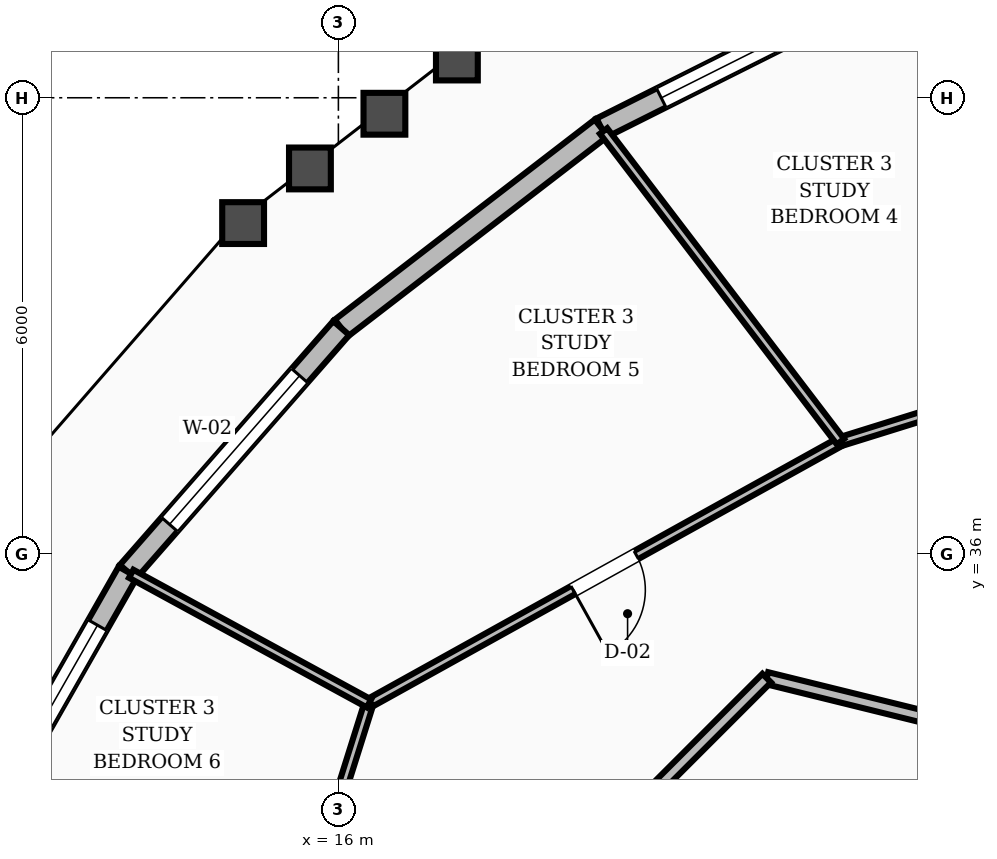
"""IFC4 building model, lengths in metres.
Left out: names, types, materials, properties, quantities, classifications, styles, units other than length and angle.
Written with IfcOpenShell. Run it as: python <this file> out.ifc"""

import sys

from ifc_helpers import new_model, si_unit, direction, frame, frame_2d, origin, place, context, subcontext, project, spatial, rectangle, extrude, element, fill, save


model = new_model("IFC4")
c1 = context("Model", 3, precision=1e-05, world=origin(), true_north=direction((0.0, 1.0)))
c2 = subcontext(c1, "Body", "Model", "MODEL_VIEW")
j1 = project(units=[si_unit("LENGTHUNIT", "METRE"), si_unit("PLANEANGLEUNIT", "RADIAN")], contexts=[c1])
p1 = place(None, origin())
s1 = spatial("IfcSite", under=j1, at=p1, CompositionType="ELEMENT")
p2 = place(p1, origin())
s2 = spatial("IfcBuilding", under=s1, at=p2, CompositionType="ELEMENT")
p3 = place(p2, frame((0.0, 0.0, 229.2)))
s3 = spatial("IfcBuildingStorey", under=s2, at=p3, CompositionType="ELEMENT", Elevation=229.2)
p4 = place(p3, frame((23.361, 43.559, 0.0), z_axis=(0.0, 0.0, 1.0), x_axis=(-0.893979362311, -0.448108134005, 0.0)))
e1 = element("IfcWall", 1, at=p4, inside=s3, PredefinedType="STANDARD", context=c2, shape_type="SweptSolid", body=[
    extrude(rectangle(XDim=4.366, YDim=0.28, at=frame_2d((2.183, 0.0))), origin(), (0.0, 0.0, 1.0), 2.88),
])
p5 = place(p4, frame((0.883, 0.0, 0.8)))
e2 = element("IfcOpeningElement", 2, at=p5, cuts=e1, PredefinedType="OPENING", context=c2, shape_type="SweptSolid", body=[
    extrude(rectangle(XDim=2.6, YDim=1.65, at=frame_2d((1.3, 0.825))), frame((0.0, 0.15, 0.0), z_axis=(0.0, -1.0, 0.0), x_axis=(1.0, 0.0, 0.0)), (0.0, 0.0, 1.0), 0.3),
])
p6 = place(p3, frame((19.458, 41.603, 0.0), z_axis=(0.0, 0.0, 1.0), x_axis=(-0.792451546341, -0.609934870869, 0.0)))
e3 = element("IfcWall", 3, at=p6, inside=s3, PredefinedType="STANDARD", context=c2, shape_type="SweptSolid", body=[
    extrude(rectangle(XDim=4.317, YDim=0.28, at=frame_2d((2.158, 0.0))), origin(), (0.0, 0.0, 1.0), 2.88),
])
p7 = place(p3, frame((16.038, 38.97, 0.0), z_axis=(0.0, 0.0, 1.0), x_axis=(-0.65855326106, -0.752534120387, 0.0)))
e4 = element("IfcWall", 4, at=p7, inside=s3, PredefinedType="STANDARD", context=c2, shape_type="SweptSolid", body=[
    extrude(rectangle(XDim=4.263, YDim=0.28, at=frame_2d((2.131, 0.0))), origin(), (0.0, 0.0, 1.0), 2.88),
])
p8 = place(p7, frame((0.832, 0.0, 0.8)))
e5 = element("IfcOpeningElement", 5, at=p8, cuts=e4, PredefinedType="OPENING", context=c2, shape_type="SweptSolid", body=[
    extrude(rectangle(XDim=2.6, YDim=1.65, at=frame_2d((1.3, 0.825))), frame((0.0, 0.15, 0.0), z_axis=(0.0, -1.0, 0.0), x_axis=(1.0, 0.0, 0.0)), (0.0, 0.0, 1.0), 0.3),
])
p9 = place(p3, frame((13.23, 35.762, 0.0), z_axis=(0.0, 0.0, 1.0), x_axis=(-0.495183798622, -0.868788239782, 0.0)))
e6 = element("IfcWall", 6, at=p9, inside=s3, PredefinedType="STANDARD", context=c2, shape_type="SweptSolid", body=[
    extrude(rectangle(XDim=4.213, YDim=0.28, at=frame_2d((2.106, 0.0))), origin(), (0.0, 0.0, 1.0), 2.88),
])
p10 = place(p9, frame((0.806, 0.0, 0.8)))
e7 = element("IfcOpeningElement", 7, at=p10, cuts=e6, PredefinedType="OPENING", context=c2, shape_type="SweptSolid", body=[
    extrude(rectangle(XDim=2.6, YDim=1.65, at=frame_2d((1.3, 0.825))), frame((0.0, 0.15, 0.0), z_axis=(0.0, -1.0, 0.0), x_axis=(1.0, 0.0, 0.0)), (0.0, 0.0, 1.0), 0.3),
])
p11 = place(p3, frame((25.752, 33.35, 0.0), z_axis=(0.0, 0.0, 1.0), x_axis=(-0.970939799552, 0.239323850978, 0.0)))
e8 = element("IfcWall", 8, at=p11, inside=s3, PredefinedType="SOLIDWALL", context=c2, shape_type="SweptSolid", body=[
    extrude(rectangle(XDim=4.241, YDim=0.16, at=frame_2d((2.12, 0.0))), origin(), (0.0, 0.0, 1.0), 2.87),
])
p12 = place(p3, frame((21.635, 34.365, 0.0), z_axis=(0.0, 0.0, 1.0), x_axis=(-0.707106781187, -0.707106781187, 0.0)))
e9 = element("IfcWall", 9, at=p12, inside=s3, PredefinedType="SOLIDWALL", context=c2, shape_type="SweptSolid", body=[
    extrude(rectangle(XDim=2.916, YDim=0.16, at=frame_2d((1.458, 0.0))), origin(), (0.0, 0.0, 1.0), 2.87),
])
p13 = place(p3, frame((25.744, 38.454, 0.0), z_axis=(0.0, 0.0, 1.0), x_axis=(-0.954716225697, -0.297517946335, 0.0)))
e10 = element("IfcWall", 10, at=p13, inside=s3, PredefinedType="PARTITIONING", context=c2, shape_type="SweptSolid", body=[
    extrude(rectangle(XDim=3.287, YDim=0.12, at=frame_2d((1.644, 0.0))), origin(), (0.0, 0.0, 1.0), 2.87),
])
p14 = place(p13, frame((1.169, 0.0, 0.0)))
e11 = element("IfcOpeningElement", 11, at=p14, cuts=e10, PredefinedType="OPENING", context=c2, shape_type="SweptSolid", body=[
    extrude(rectangle(XDim=0.95, YDim=2.1, at=frame_2d((0.475, 1.05))), frame((0.0, 0.07, 0.0), z_axis=(0.0, -1.0, 0.0), x_axis=(1.0, 0.0, 0.0)), (0.0, 0.0, 1.0), 0.14),
])
p15 = place(p3, frame((25.744, 38.454, 0.0), z_axis=(0.0, 0.0, 1.0), x_axis=(-0.422983612083, 0.906137331705, 0.0)))
e12 = element("IfcWall", 12, at=p15, inside=s3, PredefinedType="PARTITIONING", context=c2, shape_type="SweptSolid", body=[
    extrude(rectangle(XDim=5.583, YDim=0.12, at=frame_2d((2.792, 0.0))), origin(), (0.0, 0.0, 1.0), 2.87),
])
p16 = place(p3, frame((22.606, 37.476, 0.0), z_axis=(0.0, 0.0, 1.0), x_axis=(-0.87432114738, -0.485347845616, 0.0)))
e13 = element("IfcWall", 13, at=p16, inside=s3, PredefinedType="PARTITIONING", context=c2, shape_type="SweptSolid", body=[
    extrude(rectangle(XDim=7.096, YDim=0.12, at=frame_2d((3.548, 0.0))), origin(), (0.0, 0.0, 1.0), 2.87),
])
p17 = place(p16, frame((3.073, 0.0, 0.0)))
e14 = element("IfcOpeningElement", 14, at=p17, cuts=e13, PredefinedType="OPENING", context=c2, shape_type="SweptSolid", body=[
    extrude(rectangle(XDim=0.95, YDim=2.1, at=frame_2d((0.475, 1.05))), frame((0.0, 0.07, 0.0), z_axis=(0.0, -1.0, 0.0), x_axis=(1.0, 0.0, 0.0)), (0.0, 0.0, 1.0), 0.14),
])
p18 = place(p3, frame((22.606, 37.476, 0.0), z_axis=(0.0, 0.0, 1.0), x_axis=(-0.606441031296, 0.795128464816, 0.0)))
e15 = element("IfcWall", 15, at=p18, inside=s3, PredefinedType="PARTITIONING", context=c2, shape_type="SweptSolid", body=[
    extrude(rectangle(XDim=5.139, YDim=0.12, at=frame_2d((2.57, 0.0))), origin(), (0.0, 0.0, 1.0), 2.87),
])
p19 = place(p3, frame((16.402, 34.032, 0.0), z_axis=(0.0, 0.0, 1.0), x_axis=(-0.300389822632, -0.953816520333, 0.0)))
e16 = element("IfcWall", 16, at=p19, inside=s3, PredefinedType="PARTITIONING", context=c2, shape_type="SweptSolid", body=[
    extrude(rectangle(XDim=3.562, YDim=0.12, at=frame_2d((1.781, 0.0))), origin(), (0.0, 0.0, 1.0), 2.87),
])
p20 = place(p19, frame((1.306, 0.0, 0.0)))
e17 = element("IfcOpeningElement", 17, at=p20, cuts=e16, PredefinedType="OPENING", context=c2, shape_type="SweptSolid", body=[
    extrude(rectangle(XDim=0.95, YDim=2.1, at=frame_2d((0.475, 1.05))), frame((0.0, 0.07, 0.0), z_axis=(0.0, -1.0, 0.0), x_axis=(1.0, 0.0, 0.0)), (0.0, 0.0, 1.0), 0.14),
])
p21 = place(p3, frame((16.402, 34.032, 0.0), z_axis=(0.0, 0.0, 1.0), x_axis=(-0.877961046071, 0.478732077034, 0.0)))
e18 = element("IfcWall", 18, at=p21, inside=s3, PredefinedType="PARTITIONING", context=c2, shape_type="SweptSolid", body=[
    extrude(rectangle(XDim=3.562, YDim=0.12, at=frame_2d((1.781, 0.0))), origin(), (0.0, 0.0, 1.0), 2.87),
])
p22 = place(p5, origin())
e19 = element("IfcWindow", 19, at=p22, inside=s3, PartitioningType="SINGLE_PANEL", PredefinedType="WINDOW", context=c2, shape_type="SweptSolid", body=[
    extrude(rectangle(XDim=2.6, YDim=1.65, at=frame_2d((1.3, 0.825))), frame((0.0, 0.03, 0.0), z_axis=(0.0, -1.0, 0.0), x_axis=(1.0, 0.0, 0.0)), (0.0, 0.0, 1.0), 0.06),
])
fill(e2, e19)
p23 = place(p8, origin())
e20 = element("IfcWindow", 20, at=p23, inside=s3, PartitioningType="SINGLE_PANEL", PredefinedType="WINDOW", context=c2, shape_type="SweptSolid", body=[
    extrude(rectangle(XDim=2.6, YDim=1.65, at=frame_2d((1.3, 0.825))), frame((0.0, 0.03, 0.0), z_axis=(0.0, -1.0, 0.0), x_axis=(1.0, 0.0, 0.0)), (0.0, 0.0, 1.0), 0.06),
])
fill(e5, e20)
p24 = place(p10, origin())
e21 = element("IfcWindow", 21, at=p24, inside=s3, PartitioningType="SINGLE_PANEL", PredefinedType="WINDOW", context=c2, shape_type="SweptSolid", body=[
    extrude(rectangle(XDim=2.6, YDim=1.65, at=frame_2d((1.3, 0.825))), frame((0.0, 0.03, 0.0), z_axis=(0.0, -1.0, 0.0), x_axis=(1.0, 0.0, 0.0)), (0.0, 0.0, 1.0), 0.06),
])
fill(e7, e21)
p25 = place(p17, origin())
e22 = element("IfcDoor", 22, at=p25, inside=s3, OperationType="SINGLE_SWING_RIGHT", PredefinedType="DOOR", context=c2, shape_type="SweptSolid", body=[
    extrude(rectangle(XDim=0.95, YDim=2.1, at=frame_2d((0.475, 1.05))), frame((0.0, 0.025, 0.0), z_axis=(0.0, -1.0, 0.0), x_axis=(1.0, 0.0, 0.0)), (0.0, 0.0, 1.0), 0.05),
])
fill(e14, e22)
save(model, sys.argv[1])
